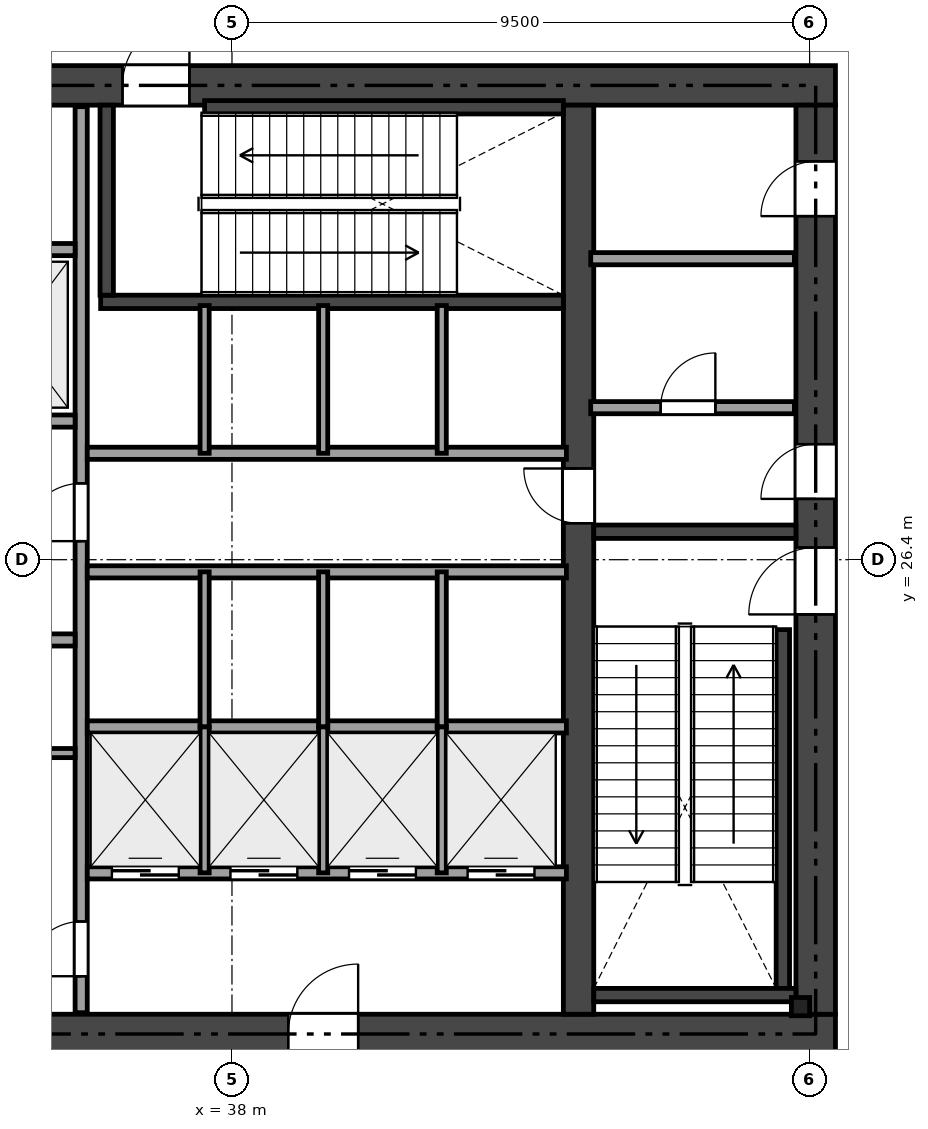
"""IFC4 building model, lengths in metres.
Left out: names, types, materials, properties, quantities, classifications, styles, units other than length and angle.
Written with IfcOpenShell. Run it as: python <this file> out.ifc"""

import sys

from ifc_helpers import new_model, si_unit, direction, frame, frame_2d, origin, origin_2d, place, context, subcontext, project, spatial, rectangle, i_section, extrude, element, fill, save


model = new_model("IFC4")
c1 = context("Model", 3, precision=1e-05, world=origin(), true_north=direction((0.0, 1.0)))
c2 = subcontext(c1, "Body", "Model", "MODEL_VIEW")
j1 = project(units=[si_unit("LENGTHUNIT", "METRE"), si_unit("PLANEANGLEUNIT", "RADIAN")], contexts=[c1])
p1 = place(None, origin())
s1 = spatial("IfcSite", under=j1, at=p1, CompositionType="ELEMENT")
p2 = place(p1, origin())
s2 = spatial("IfcBuilding", under=s1, at=p2, CompositionType="ELEMENT")
p3 = place(p2, frame((0.0, 0.0, 16.2)))
s3 = spatial("IfcBuildingStorey", under=s2, at=p3, CompositionType="ELEMENT", Elevation=16.2)
p4 = place(p3, frame((26.475, 18.6, 0.0), z_axis=(0.0, 0.0, 1.0), x_axis=(1.0, 0.0, 0.0)))
e1 = element("IfcWall", 1, at=p4, inside=s3, PredefinedType="SHEAR", context=c2, shape_type="SweptSolid", body=[
    extrude(rectangle(XDim=21.45, YDim=0.65, at=frame_2d((10.725, 0.0))), origin(), (0.0, 0.0, 1.0), 4.98),
])
p5 = place(p4, frame((12.45, 0.0, 0.0)))
e2 = element("IfcOpeningElement", 2, at=p5, cuts=e1, PredefinedType="OPENING", context=c2, shape_type="SweptSolid", body=[
    extrude(rectangle(XDim=1.15, YDim=2.15, at=frame_2d((0.575, 1.075))), frame((0.0, 0.335, 0.0), z_axis=(0.0, -1.0, 0.0), x_axis=(1.0, 0.0, 0.0)), (0.0, 0.0, 1.0), 0.67),
])
p6 = place(p4, frame((5.275, 0.0, 0.0)))
e3 = element("IfcOpeningElement", 3, at=p6, cuts=e1, PredefinedType="OPENING", context=c2, shape_type="SweptSolid", body=[
    extrude(rectangle(XDim=0.9, YDim=2.1, at=frame_2d((0.45, 1.05))), frame((0.0, 0.335, 0.0), z_axis=(0.0, -1.0, 0.0), x_axis=(1.0, 0.0, 0.0)), (0.0, 0.0, 1.0), 0.67),
])
p7 = place(p3, frame((26.475, 34.2, 0.0), z_axis=(0.0, 0.0, 1.0), x_axis=(1.0, 0.0, 0.0)))
e4 = element("IfcWall", 4, at=p7, inside=s3, PredefinedType="SHEAR", context=c2, shape_type="SweptSolid", body=[
    extrude(rectangle(XDim=21.45, YDim=0.65, at=frame_2d((10.725, 0.0))), origin(), (0.0, 0.0, 1.0), 4.98),
])
p8 = place(p7, frame((9.725, 0.0, 0.0)))
e5 = element("IfcOpeningElement", 5, at=p8, cuts=e4, PredefinedType="OPENING", context=c2, shape_type="SweptSolid", body=[
    extrude(rectangle(XDim=1.1, YDim=2.15, at=frame_2d((0.55, 1.075))), frame((0.0, 0.335, 0.0), z_axis=(0.0, -1.0, 0.0), x_axis=(1.0, 0.0, 0.0)), (0.0, 0.0, 1.0), 0.67),
])
p9 = place(p7, frame((1.975, 0.0, 0.0)))
e6 = element("IfcOpeningElement", 6, at=p9, cuts=e4, PredefinedType="OPENING", context=c2, shape_type="SweptSolid", body=[
    extrude(rectangle(XDim=0.9, YDim=2.1, at=frame_2d((0.45, 1.05))), frame((0.0, 0.335, 0.0), z_axis=(0.0, -1.0, 0.0), x_axis=(1.0, 0.0, 0.0)), (0.0, 0.0, 1.0), 0.67),
])
p10 = place(p7, frame((6.275, 0.0, 0.0)))
e7 = element("IfcOpeningElement", 7, at=p10, cuts=e4, PredefinedType="OPENING", context=c2, shape_type="SweptSolid", body=[
    extrude(rectangle(XDim=0.9, YDim=2.1, at=frame_2d((0.45, 1.05))), frame((0.0, 0.335, 0.0), z_axis=(0.0, -1.0, 0.0), x_axis=(1.0, 0.0, 0.0)), (0.0, 0.0, 1.0), 0.67),
])
p11 = place(p3, frame((47.6, 18.925, 0.0), z_axis=(0.0, 0.0, 1.0), x_axis=(0.0, 1.0, 0.0)))
e8 = element("IfcWall", 8, at=p11, inside=s3, PredefinedType="SHEAR", context=c2, shape_type="SweptSolid", body=[
    extrude(rectangle(XDim=14.95, YDim=0.65, at=frame_2d((7.475, 0.0))), origin(), (0.0, 0.0, 1.0), 4.98),
])
p12 = place(p11, frame((6.575, 0.0, 0.0)))
e9 = element("IfcOpeningElement", 9, at=p12, cuts=e8, PredefinedType="OPENING", context=c2, shape_type="SweptSolid", body=[
    extrude(rectangle(XDim=1.1, YDim=2.15, at=frame_2d((0.55, 1.075))), frame((0.0, 0.335, 0.0), z_axis=(0.0, -1.0, 0.0), x_axis=(1.0, 0.0, 0.0)), (0.0, 0.0, 1.0), 0.67),
])
p13 = place(p11, frame((8.475, 0.0, 0.0)))
e10 = element("IfcOpeningElement", 10, at=p13, cuts=e8, PredefinedType="OPENING", context=c2, shape_type="SweptSolid", body=[
    extrude(rectangle(XDim=0.9, YDim=2.1, at=frame_2d((0.45, 1.05))), frame((0.0, 0.335, 0.0), z_axis=(0.0, -1.0, 0.0), x_axis=(1.0, 0.0, 0.0)), (0.0, 0.0, 1.0), 0.67),
])
p14 = place(p11, frame((13.125, 0.0, 0.0)))
e11 = element("IfcOpeningElement", 11, at=p14, cuts=e8, PredefinedType="OPENING", context=c2, shape_type="SweptSolid", body=[
    extrude(rectangle(XDim=0.9, YDim=2.1, at=frame_2d((0.45, 1.05))), frame((0.0, 0.335, 0.0), z_axis=(0.0, -1.0, 0.0), x_axis=(1.0, 0.0, 0.0)), (0.0, 0.0, 1.0), 0.67),
])
p15 = place(p3, frame((43.7, 18.925, 0.0), z_axis=(0.0, 0.0, 1.0), x_axis=(0.0, 1.0, 0.0)))
e12 = element("IfcWall", 12, at=p15, inside=s3, PredefinedType="SHEAR", context=c2, shape_type="SweptSolid", body=[
    extrude(rectangle(XDim=14.95, YDim=0.5, at=frame_2d((7.475, 0.0))), origin(), (0.0, 0.0, 1.0), 4.98),
])
p16 = place(p15, frame((8.075, 0.0, 0.0)))
e13 = element("IfcOpeningElement", 13, at=p16, cuts=e12, PredefinedType="OPENING", context=c2, shape_type="SweptSolid", body=[
    extrude(rectangle(XDim=0.9, YDim=2.1, at=frame_2d((0.45, 1.05))), frame((0.0, 0.26, 0.0), z_axis=(0.0, -1.0, 0.0), x_axis=(1.0, 0.0, 0.0)), (0.0, 0.0, 1.0), 0.52),
])
p17 = place(p3, frame((43.95, 26.86, 0.0), z_axis=(0.0, 0.0, 1.0), x_axis=(1.0, 0.0, 0.0)))
e14 = element("IfcWall", 14, at=p17, inside=s3, PredefinedType="SHEAR", context=c2, shape_type="SweptSolid", body=[
    extrude(rectangle(XDim=3.325, YDim=0.22, at=frame_2d((1.663, 0.0))), origin(), (0.0, 0.0, 1.0), 4.98),
])
p18 = place(p3, frame((47.06, 19.35, 0.0), z_axis=(0.0, 0.0, 1.0), x_axis=(0.0, 1.0, 0.0)))
e15 = element("IfcWall", 15, at=p18, inside=s3, PredefinedType="SHEAR", context=c2, shape_type="SweptSolid", body=[
    extrude(rectangle(XDim=5.9, YDim=0.22, at=frame_2d((2.95, 0.0))), origin(), (0.0, 0.0, 1.0), 4.98),
])
p19 = place(p3, frame((43.95, 19.24, 0.0), z_axis=(0.0, 0.0, 1.0), x_axis=(1.0, 0.0, 0.0)))
e16 = element("IfcWall", 16, at=p19, inside=s3, PredefinedType="SHEAR", context=c2, shape_type="SweptSolid", body=[
    extrude(rectangle(XDim=3.325, YDim=0.22, at=frame_2d((1.663, 0.0))), origin(), (0.0, 0.0, 1.0), 4.98),
])
p20 = place(p3, frame((35.84, 30.64, 0.0), z_axis=(0.0, 0.0, 1.0), x_axis=(1.0, 0.0, 0.0)))
e17 = element("IfcWall", 17, at=p20, inside=s3, PredefinedType="SHEAR", context=c2, shape_type="SweptSolid", body=[
    extrude(rectangle(XDim=7.61, YDim=0.22, at=frame_2d((3.805, 0.0))), origin(), (0.0, 0.0, 1.0), 4.98),
])
p21 = place(p3, frame((35.94, 30.75, 0.0), z_axis=(0.0, 0.0, 1.0), x_axis=(0.0, 1.0, 0.0)))
e18 = element("IfcWall", 18, at=p21, inside=s3, PredefinedType="SHEAR", context=c2, shape_type="SweptSolid", body=[
    extrude(rectangle(XDim=3.125, YDim=0.22, at=frame_2d((1.562, 0.0))), origin(), (0.0, 0.0, 1.0), 4.98),
])
p22 = place(p3, frame((37.55, 33.84, 0.0), z_axis=(0.0, 0.0, 1.0), x_axis=(1.0, 0.0, 0.0)))
e19 = element("IfcWall", 19, at=p22, inside=s3, PredefinedType="SHEAR", context=c2, shape_type="SweptSolid", body=[
    extrude(rectangle(XDim=5.9, YDim=0.22, at=frame_2d((2.95, 0.0))), origin(), (0.0, 0.0, 1.0), 4.98),
])
p23 = place(p3, frame((47.35, 19.05, 0.0), z_axis=(0.0, 0.0, 1.0), x_axis=(1.0, 0.0, 0.0)))
e20 = element("IfcColumn", 20, at=p23, inside=s3, PredefinedType="PILASTER", context=c2, shape_type="SweptSolid", body=[
    extrude(i_section(OverallWidth=0.3, OverallDepth=0.3, WebThickness=0.011, FlangeThickness=0.019, at=origin_2d()), origin(), (0.0, 0.0, 1.0), 4.98),
])
p24 = place(p3, frame((43.9, 28.9, 0.0), z_axis=(0.0, 0.0, 1.0), x_axis=(1.0, 0.0, 0.0)))
e21 = element("IfcWall", 21, at=p24, inside=s3, PredefinedType="SOLIDWALL", context=c2, shape_type="SweptSolid", body=[
    extrude(rectangle(XDim=3.35, YDim=0.2, at=frame_2d((1.675, 0.0))), origin(), (0.0, 0.0, 1.0), 4.98),
])
p25 = place(p24, frame((1.15, 0.0, 0.0)))
e22 = element("IfcOpeningElement", 22, at=p25, cuts=e21, PredefinedType="OPENING", context=c2, shape_type="SweptSolid", body=[
    extrude(rectangle(XDim=0.9, YDim=2.1, at=frame_2d((0.45, 1.05))), frame((0.0, 0.11, 0.0), z_axis=(0.0, -1.0, 0.0), x_axis=(1.0, 0.0, 0.0)), (0.0, 0.0, 1.0), 0.22),
])
p26 = place(p3, frame((43.9, 31.35, 0.0), z_axis=(0.0, 0.0, 1.0), x_axis=(1.0, 0.0, 0.0)))
e23 = element("IfcWall", 23, at=p26, inside=s3, PredefinedType="SOLIDWALL", context=c2, shape_type="SweptSolid", body=[
    extrude(rectangle(XDim=3.35, YDim=0.2, at=frame_2d((1.675, 0.0))), origin(), (0.0, 0.0, 1.0), 4.98),
])
p27 = place(p3, frame((35.52, 18.95, 0.0), z_axis=(0.0, 0.0, 1.0), x_axis=(0.0, 1.0, 0.0)))
e24 = element("IfcWall", 24, at=p27, inside=s3, PredefinedType="SOLIDWALL", context=c2, shape_type="SweptSolid", body=[
    extrude(rectangle(XDim=14.9, YDim=0.2, at=frame_2d((7.45, 0.0))), origin(), (0.0, 0.0, 1.0), 4.501),
])
p28 = place(p27, frame((7.755, 0.0, 0.0)))
e25 = element("IfcOpeningElement", 25, at=p28, cuts=e24, PredefinedType="OPENING", context=c2, shape_type="SweptSolid", body=[
    extrude(rectangle(XDim=0.95, YDim=2.15, at=frame_2d((0.475, 1.075))), frame((0.0, 0.11, 0.0), z_axis=(0.0, -1.0, 0.0), x_axis=(1.0, 0.0, 0.0)), (0.0, 0.0, 1.0), 0.22),
])
p29 = place(p27, frame((0.6, 0.0, 0.0)))
e26 = element("IfcOpeningElement", 26, at=p29, cuts=e24, PredefinedType="OPENING", context=c2, shape_type="SweptSolid", body=[
    extrude(rectangle(XDim=0.9, YDim=2.1, at=frame_2d((0.45, 1.05))), frame((0.0, 0.11, 0.0), z_axis=(0.0, -1.0, 0.0), x_axis=(1.0, 0.0, 0.0)), (0.0, 0.0, 1.0), 0.22),
])
p30 = place(p3, frame((31.0, 28.68, 0.0), z_axis=(0.0, 0.0, 1.0), x_axis=(1.0, 0.0, 0.0)))
e27 = element("IfcWall", 27, at=p30, inside=s3, PredefinedType="SOLIDWALL", context=c2, shape_type="SweptSolid", body=[
    extrude(rectangle(XDim=4.42, YDim=0.2, at=frame_2d((2.21, 0.0))), origin(), (0.0, 0.0, 1.0), 4.98),
])
p31 = place(p30, frame((0.6, 0.0, 0.0)))
e28 = element("IfcOpeningElement", 28, at=p31, cuts=e27, PredefinedType="OPENING", context=c2, shape_type="SweptSolid", body=[
    extrude(rectangle(XDim=1.1, YDim=2.15, at=frame_2d((0.55, 1.075))), frame((0.0, 0.11, 0.0), z_axis=(0.0, -1.0, 0.0), x_axis=(1.0, 0.0, 0.0)), (0.0, 0.0, 1.0), 0.22),
])
p32 = place(p30, frame((2.85, 0.0, 0.0)))
e29 = element("IfcOpeningElement", 29, at=p32, cuts=e27, PredefinedType="OPENING", context=c2, shape_type="SweptSolid", body=[
    extrude(rectangle(XDim=1.1, YDim=2.15, at=frame_2d((0.55, 1.075))), frame((0.0, 0.11, 0.0), z_axis=(0.0, -1.0, 0.0), x_axis=(1.0, 0.0, 0.0)), (0.0, 0.0, 1.0), 0.22),
])
p33 = place(p3, frame((31.0, 31.5, 0.0), z_axis=(0.0, 0.0, 1.0), x_axis=(1.0, 0.0, 0.0)))
e30 = element("IfcWall", 30, at=p33, inside=s3, PredefinedType="SOLIDWALL", context=c2, shape_type="SweptSolid", body=[
    extrude(rectangle(XDim=4.42, YDim=0.2, at=frame_2d((2.21, 0.0))), origin(), (0.0, 0.0, 1.0), 4.98),
])
p34 = place(p3, frame((31.0, 25.08, 0.0), z_axis=(0.0, 0.0, 1.0), x_axis=(1.0, 0.0, 0.0)))
e31 = element("IfcWall", 31, at=p34, inside=s3, PredefinedType="SOLIDWALL", context=c2, shape_type="SweptSolid", body=[
    extrude(rectangle(XDim=4.42, YDim=0.2, at=frame_2d((2.21, 0.0))), origin(), (0.0, 0.0, 1.0), 4.98),
])
p35 = place(p34, frame((3.0, 0.0, 0.0)))
e32 = element("IfcOpeningElement", 32, at=p35, cuts=e31, PredefinedType="OPENING", context=c2, shape_type="SweptSolid", body=[
    extrude(rectangle(XDim=0.9, YDim=2.1, at=frame_2d((0.45, 1.05))), frame((0.0, 0.11, 0.0), z_axis=(0.0, -1.0, 0.0), x_axis=(1.0, 0.0, 0.0)), (0.0, 0.0, 1.0), 0.22),
])
p36 = place(p34, frame((0.62, 0.0, 0.0)))
e33 = element("IfcOpeningElement", 33, at=p36, cuts=e31, PredefinedType="OPENING", context=c2, shape_type="SweptSolid", body=[
    extrude(rectangle(XDim=1.2, YDim=2.15, at=frame_2d((0.6, 1.075))), frame((0.0, 0.11, 0.0), z_axis=(0.0, -1.0, 0.0), x_axis=(1.0, 0.0, 0.0)), (0.0, 0.0, 1.0), 0.22),
])
p37 = place(p3, frame((33.42, 23.22, 0.0), z_axis=(0.0, 0.0, 1.0), x_axis=(1.0, 0.0, 0.0)))
e34 = element("IfcWall", 34, at=p37, inside=s3, PredefinedType="PARTITIONING", context=c2, shape_type="SweptSolid", body=[
    extrude(rectangle(XDim=2.0, YDim=0.15, at=frame_2d((1.0, 0.0))), origin(), (0.0, 0.0, 1.0), 4.98),
])
for number, where, z_axis, x_axis in (
    (35, (35.62, 28.15, 0.0), (0.0, 0.0, 1.0), (1.0, 0.0, 0.0)),
    (36, (35.62, 26.2, 0.0), (0.0, 0.0, 1.0), (1.0, 0.0, 0.0)),
):
    element("IfcWall", number, at=place(p3, frame(where, z_axis=z_axis, x_axis=x_axis)), inside=s3, PredefinedType="SOLIDWALL", context=c2, shape_type="SweptSolid", body=[
        extrude(rectangle(XDim=7.88, YDim=0.2, at=frame_2d((3.94, 0.0))), origin(), (0.0, 0.0, 1.0), 4.98),
    ])
p38 = place(p3, frame((35.62, 23.65, 0.0), z_axis=(0.0, 0.0, 1.0), x_axis=(1.0, 0.0, 0.0)))
e37 = element("IfcWall", 37, at=p38, inside=s3, PredefinedType="SOLIDWALL", context=c2, shape_type="SweptSolid", body=[
    extrude(rectangle(XDim=7.88, YDim=0.2, at=frame_2d((3.94, 0.0))), origin(), (0.0, 0.0, 1.0), 4.501),
])
p39 = place(p3, frame((35.62, 21.25, 0.0), z_axis=(0.0, 0.0, 1.0), x_axis=(1.0, 0.0, 0.0)))
e38 = element("IfcWall", 38, at=p39, inside=s3, PredefinedType="SOLIDWALL", context=c2, shape_type="SweptSolid", body=[
    extrude(rectangle(XDim=7.88, YDim=0.2, at=frame_2d((3.94, 0.0))), origin(), (0.0, 0.0, 1.0), 4.98),
])
p40 = place(p39, frame((0.405, 0.0, 0.0)))
e39 = element("IfcOpeningElement", 39, at=p40, cuts=e38, PredefinedType="OPENING", context=c2, shape_type="SweptSolid", body=[
    extrude(rectangle(XDim=1.1, YDim=2.15, at=frame_2d((0.55, 1.075))), frame((0.0, 0.11, 0.0), z_axis=(0.0, -1.0, 0.0), x_axis=(1.0, 0.0, 0.0)), (0.0, 0.0, 1.0), 0.22),
])
p41 = place(p39, frame((2.355, 0.0, 0.0)))
e40 = element("IfcOpeningElement", 40, at=p41, cuts=e38, PredefinedType="OPENING", context=c2, shape_type="SweptSolid", body=[
    extrude(rectangle(XDim=1.1, YDim=2.15, at=frame_2d((0.55, 1.075))), frame((0.0, 0.11, 0.0), z_axis=(0.0, -1.0, 0.0), x_axis=(1.0, 0.0, 0.0)), (0.0, 0.0, 1.0), 0.22),
])
p42 = place(p39, frame((4.305, 0.0, 0.0)))
e41 = element("IfcOpeningElement", 41, at=p42, cuts=e38, PredefinedType="OPENING", context=c2, shape_type="SweptSolid", body=[
    extrude(rectangle(XDim=1.1, YDim=2.15, at=frame_2d((0.55, 1.075))), frame((0.0, 0.11, 0.0), z_axis=(0.0, -1.0, 0.0), x_axis=(1.0, 0.0, 0.0)), (0.0, 0.0, 1.0), 0.22),
])
p43 = place(p39, frame((6.255, 0.0, 0.0)))
e42 = element("IfcOpeningElement", 42, at=p43, cuts=e38, PredefinedType="OPENING", context=c2, shape_type="SweptSolid", body=[
    extrude(rectangle(XDim=1.1, YDim=2.15, at=frame_2d((0.55, 1.075))), frame((0.0, 0.11, 0.0), z_axis=(0.0, -1.0, 0.0), x_axis=(1.0, 0.0, 0.0)), (0.0, 0.0, 1.0), 0.22),
])
for number, where, z_axis, x_axis in (
    (43, (37.55, 28.15, 0.0), (0.0, 0.0, 1.0), (0.0, 1.0, 0.0)),
    (44, (39.5, 28.15, 0.0), (0.0, 0.0, 1.0), (0.0, 1.0, 0.0)),
    (45, (41.45, 28.15, 0.0), (0.0, 0.0, 1.0), (0.0, 1.0, 0.0)),
):
    element("IfcWall", number, at=place(p3, frame(where, z_axis=z_axis, x_axis=x_axis)), inside=s3, PredefinedType="PARTITIONING", context=c2, shape_type="SweptSolid", body=[
        extrude(rectangle(XDim=2.43, YDim=0.15, at=frame_2d((1.215, 0.0))), origin(), (0.0, 0.0, 1.0), 4.98),
    ])
for number, where, z_axis, x_axis in (
    (46, (37.55, 23.65, 0.0), (0.0, 0.0, 1.0), (0.0, 1.0, 0.0)),
    (47, (39.5, 23.65, 0.0), (0.0, 0.0, 1.0), (0.0, 1.0, 0.0)),
    (48, (41.45, 23.65, 0.0), (0.0, 0.0, 1.0), (0.0, 1.0, 0.0)),
):
    element("IfcWall", number, at=place(p3, frame(where, z_axis=z_axis, x_axis=x_axis)), inside=s3, PredefinedType="PARTITIONING", context=c2, shape_type="SweptSolid", body=[
        extrude(rectangle(XDim=2.55, YDim=0.15, at=frame_2d((1.275, 0.0))), origin(), (0.0, 0.0, 1.0), 4.501),
    ])
for number, where, z_axis, x_axis in (
    (49, (37.55, 21.25, 0.0), (0.0, 0.0, 1.0), (0.0, 1.0, 0.0)),
    (50, (39.5, 21.25, 0.0), (0.0, 0.0, 1.0), (0.0, 1.0, 0.0)),
    (51, (41.45, 21.25, 0.0), (0.0, 0.0, 1.0), (0.0, 1.0, 0.0)),
):
    element("IfcWall", number, at=place(p3, frame(where, z_axis=z_axis, x_axis=x_axis)), inside=s3, PredefinedType="PARTITIONING", context=c2, shape_type="SweptSolid", body=[
        extrude(rectangle(XDim=2.4, YDim=0.15, at=frame_2d((1.2, 0.0))), origin(), (0.0, 0.0, 1.0), 4.501),
    ])
p44 = place(p12, origin())
e52 = element("IfcDoor", 52, at=p44, inside=s3, OperationType="SINGLE_SWING_LEFT", PredefinedType="DOOR", context=c2, shape_type="SweptSolid", body=[
    extrude(rectangle(XDim=1.1, YDim=2.15, at=frame_2d((0.55, 1.075))), frame((0.0, 0.025, 0.0), z_axis=(0.0, -1.0, 0.0), x_axis=(1.0, 0.0, 0.0)), (0.0, 0.0, 1.0), 0.05),
])
fill(e9, e52)
p45 = place(p8, origin())
e53 = element("IfcDoor", 53, at=p45, inside=s3, OperationType="SINGLE_SWING_RIGHT", PredefinedType="DOOR", context=c2, shape_type="SweptSolid", body=[
    extrude(rectangle(XDim=1.1, YDim=2.15, at=frame_2d((0.55, 1.075))), frame((0.0, 0.025, 0.0), z_axis=(0.0, -1.0, 0.0), x_axis=(1.0, 0.0, 0.0)), (0.0, 0.0, 1.0), 0.05),
])
fill(e5, e53)
p46 = place(p28, origin())
e54 = element("IfcDoor", 54, at=p46, inside=s3, OperationType="SINGLE_SWING_LEFT", PredefinedType="DOOR", context=c2, shape_type="SweptSolid", body=[
    extrude(rectangle(XDim=0.95, YDim=2.15, at=frame_2d((0.475, 1.075))), frame((0.0, 0.025, 0.0), z_axis=(0.0, -1.0, 0.0), x_axis=(1.0, 0.0, 0.0)), (0.0, 0.0, 1.0), 0.05),
])
fill(e25, e54)
p47 = place(p16, origin())
e55 = element("IfcDoor", 55, at=p47, inside=s3, OperationType="SINGLE_SWING_RIGHT", PredefinedType="DOOR", context=c2, shape_type="SweptSolid", body=[
    extrude(rectangle(XDim=0.9, YDim=2.1, at=frame_2d((0.45, 1.05))), frame((0.0, 0.025, 0.0), z_axis=(0.0, -1.0, 0.0), x_axis=(1.0, 0.0, 0.0)), (0.0, 0.0, 1.0), 0.05),
])
fill(e13, e55)
p48 = place(p13, origin())
e56 = element("IfcDoor", 56, at=p48, inside=s3, OperationType="SINGLE_SWING_LEFT", PredefinedType="DOOR", context=c2, shape_type="SweptSolid", body=[
    extrude(rectangle(XDim=0.9, YDim=2.1, at=frame_2d((0.45, 1.05))), frame((0.0, 0.025, 0.0), z_axis=(0.0, -1.0, 0.0), x_axis=(1.0, 0.0, 0.0)), (0.0, 0.0, 1.0), 0.05),
])
fill(e10, e56)
p49 = place(p5, origin())
e57 = element("IfcDoor", 57, at=p49, inside=s3, OperationType="SINGLE_SWING_RIGHT", PredefinedType="DOOR", context=c2, shape_type="SweptSolid", body=[
    extrude(rectangle(XDim=1.15, YDim=2.15, at=frame_2d((0.575, 1.075))), frame((0.0, 0.025, 0.0), z_axis=(0.0, -1.0, 0.0), x_axis=(1.0, 0.0, 0.0)), (0.0, 0.0, 1.0), 0.05),
])
fill(e2, e57)
p50 = place(p25, origin())
e58 = element("IfcDoor", 58, at=p50, inside=s3, OperationType="SINGLE_SWING_RIGHT", PredefinedType="DOOR", context=c2, shape_type="SweptSolid", body=[
    extrude(rectangle(XDim=0.9, YDim=2.1, at=frame_2d((0.45, 1.05))), frame((0.0, 0.025, 0.0), z_axis=(0.0, -1.0, 0.0), x_axis=(1.0, 0.0, 0.0)), (0.0, 0.0, 1.0), 0.05),
])
fill(e22, e58)
p51 = place(p14, origin())
e59 = element("IfcDoor", 59, at=p51, inside=s3, OperationType="SINGLE_SWING_LEFT", PredefinedType="DOOR", context=c2, shape_type="SweptSolid", body=[
    extrude(rectangle(XDim=0.9, YDim=2.1, at=frame_2d((0.45, 1.05))), frame((0.0, 0.025, 0.0), z_axis=(0.0, -1.0, 0.0), x_axis=(1.0, 0.0, 0.0)), (0.0, 0.0, 1.0), 0.05),
])
fill(e11, e59)
p52 = place(p29, origin())
e60 = element("IfcDoor", 60, at=p52, inside=s3, OperationType="SINGLE_SWING_LEFT", PredefinedType="DOOR", context=c2, shape_type="SweptSolid", body=[
    extrude(rectangle(XDim=0.9, YDim=2.1, at=frame_2d((0.45, 1.05))), frame((0.0, 0.025, 0.0), z_axis=(0.0, -1.0, 0.0), x_axis=(1.0, 0.0, 0.0)), (0.0, 0.0, 1.0), 0.05),
])
fill(e26, e60)
p53 = place(p40, origin())
e61 = element("IfcDoor", 61, at=p53, inside=s3, OperationType="SLIDING_TO_LEFT", PredefinedType="DOOR", context=c2, shape_type="SweptSolid", body=[
    extrude(rectangle(XDim=1.1, YDim=2.15, at=frame_2d((0.55, 1.075))), frame((0.0, 0.025, 0.0), z_axis=(0.0, -1.0, 0.0), x_axis=(1.0, 0.0, 0.0)), (0.0, 0.0, 1.0), 0.05),
])
fill(e39, e61)
p54 = place(p41, origin())
e62 = element("IfcDoor", 62, at=p54, inside=s3, OperationType="SLIDING_TO_LEFT", PredefinedType="DOOR", context=c2, shape_type="SweptSolid", body=[
    extrude(rectangle(XDim=1.1, YDim=2.15, at=frame_2d((0.55, 1.075))), frame((0.0, 0.025, 0.0), z_axis=(0.0, -1.0, 0.0), x_axis=(1.0, 0.0, 0.0)), (0.0, 0.0, 1.0), 0.05),
])
fill(e40, e62)
p55 = place(p42, origin())
e63 = element("IfcDoor", 63, at=p55, inside=s3, OperationType="SLIDING_TO_LEFT", PredefinedType="DOOR", context=c2, shape_type="SweptSolid", body=[
    extrude(rectangle(XDim=1.1, YDim=2.15, at=frame_2d((0.55, 1.075))), frame((0.0, 0.025, 0.0), z_axis=(0.0, -1.0, 0.0), x_axis=(1.0, 0.0, 0.0)), (0.0, 0.0, 1.0), 0.05),
])
fill(e41, e63)
p56 = place(p43, origin())
e64 = element("IfcDoor", 64, at=p56, inside=s3, OperationType="SLIDING_TO_LEFT", PredefinedType="DOOR", context=c2, shape_type="SweptSolid", body=[
    extrude(rectangle(XDim=1.1, YDim=2.15, at=frame_2d((0.55, 1.075))), frame((0.0, 0.025, 0.0), z_axis=(0.0, -1.0, 0.0), x_axis=(1.0, 0.0, 0.0)), (0.0, 0.0, 1.0), 0.05),
])
fill(e42, e64)
save(model, sys.argv[1])
